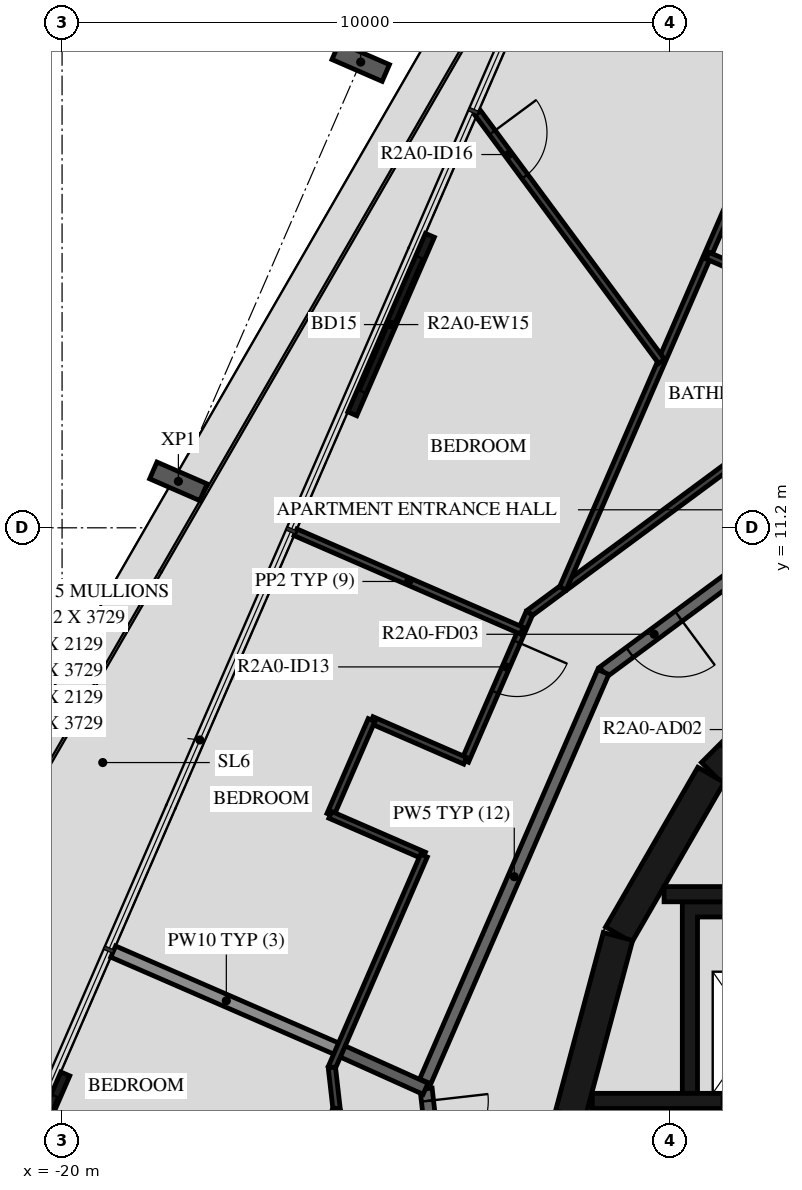
"""IFC4 building model, lengths in metres.
Left out: names, types, materials, properties, quantities, classifications, styles, units other than length and angle.
Written with IfcOpenShell. Run it as: python <this file> out.ifc"""

import sys

from ifc_helpers import new_model, si_unit, direction, frame, frame_2d, origin, origin_2d, place, context, subcontext, project, spatial, polyline, rectangle, i_section, outline, extrude, element, fill, save


model = new_model("IFC4")
c1 = context("Model", 3, precision=1e-05, world=origin(), true_north=direction((0.0, 1.0)))
c2 = subcontext(c1, "Body", "Model", "MODEL_VIEW")
j1 = project(units=[si_unit("LENGTHUNIT", "METRE"), si_unit("PLANEANGLEUNIT", "RADIAN")], contexts=[c1])
p1 = place(None, origin())
s1 = spatial("IfcSite", under=j1, at=p1, CompositionType="ELEMENT")
p2 = place(p1, origin())
s2 = spatial("IfcBuilding", under=s1, at=p2, CompositionType="ELEMENT")
p3 = place(p2, frame((0.0, 0.0, 76.7)))
s3 = spatial("IfcBuildingStorey", under=s2, at=p3, CompositionType="ELEMENT", Elevation=76.7)
for number, where, z_axis, x_axis in (
    (1, (-15.089, 18.859, -0.45), (0.0, 0.0, 1.0), (0.399, 0.917, 0.0)),
    (2, (-18.087, 11.964, -0.45), (0.0, 0.0, 1.0), (0.399, 0.917, 0.0)),
):
    element("IfcColumn", number, at=place(p3, frame(where, z_axis=z_axis, x_axis=x_axis)), inside=s3, PredefinedType="COLUMN", context=c2, shape_type="SweptSolid", body=[
        extrude(i_section(OverallWidth=0.3, OverallDepth=0.9, WebThickness=0.019, FlangeThickness=0.035, FilletRadius=0.03, at=origin_2d()), origin(), (0.0, 0.0, 1.0), 3.57),
    ])
p4 = place(p3, frame((-13.951, 16.01, 0.0), z_axis=(0.0, 0.0, 1.0), x_axis=(-0.398720531764, -0.917072482168, 0.0)))
e3 = element("IfcWall", 3, at=p4, inside=s3, PredefinedType="STANDARD", context=c2, shape_type="SweptSolid", body=[
    extrude(rectangle(XDim=3.2, YDim=0.16, at=frame_2d((1.6, 0.0))), origin(), (0.0, 0.0, 1.0), 3.12),
])
p5 = place(p4, frame((0.4, 0.0, 0.0)))
e4 = element("IfcOpeningElement", 4, at=p5, cuts=e3, PredefinedType="OPENING", context=c2, shape_type="SweptSolid", body=[
    extrude(rectangle(XDim=2.4, YDim=2.4, at=frame_2d((1.2, 1.2))), frame((0.0, 0.09, 0.0), z_axis=(0.0, -1.0, 0.0), x_axis=(1.0, 0.0, 0.0)), (0.0, 0.0, 1.0), 0.18),
])
p6 = place(p3, frame((-19.947, 2.219, 0.0), z_axis=(0.0, 0.0, 1.0), x_axis=(-0.398784695066, -0.917044582876, 0.0)))
e5 = element("IfcWall", 5, at=p6, inside=s3, PredefinedType="STANDARD", context=c2, shape_type="SweptSolid", body=[
    extrude(rectangle(XDim=3.2, YDim=0.16, at=frame_2d((1.6, 0.0))), origin(), (0.0, 0.0, 1.0), 3.12),
])
p7 = place(p6, frame((0.4, 0.0, 0.0)))
e6 = element("IfcOpeningElement", 6, at=p7, cuts=e5, PredefinedType="OPENING", context=c2, shape_type="SweptSolid", body=[
    extrude(rectangle(XDim=2.4, YDim=2.4, at=frame_2d((1.2, 1.2))), frame((0.0, 0.09, 0.0), z_axis=(0.0, -1.0, 0.0), x_axis=(1.0, 0.0, 0.0)), (0.0, 0.0, 1.0), 0.18),
])
p8 = place(p3, frame((-7.164, 9.308, 0.0), z_axis=(0.0, 0.0, 1.0), x_axis=(-0.707106781187, -0.707106781187, 0.0)))
e7 = element("IfcWall", 7, at=p8, inside=s3, PredefinedType="SHEAR", context=c2, shape_type="SweptSolid", body=[
    extrude(rectangle(XDim=3.032, YDim=0.5, at=frame_2d((1.516, 0.0))), origin(), (0.0, 0.0, 1.0), 3.12),
])
p9 = place(p8, frame((1.416, 0.0, 0.0)))
e8 = element("IfcOpeningElement", 8, at=p9, cuts=e7, PredefinedType="OPENING", context=c2, shape_type="SweptSolid", body=[
    extrude(rectangle(XDim=1.2, YDim=2.1, at=frame_2d((0.6, 1.05))), frame((0.0, 0.26, 0.0), z_axis=(0.0, -1.0, 0.0), x_axis=(1.0, 0.0, 0.0)), (0.0, 0.0, 1.0), 0.52),
])
for number, where, z_axis, x_axis in (
    (9, (-9.329, 7.137, 0.0), (0.0, 0.0, 1.0), (-0.5, -0.866, 0.0)),
    (10, (-10.858, 4.479, 0.0), (0.0, 0.0, 1.0), (-0.259, -0.966, 0.0)),
):
    element("IfcWall", number, at=place(p3, frame(where, z_axis=z_axis, x_axis=x_axis)), inside=s3, PredefinedType="SHEAR", context=c2, shape_type="SweptSolid", body=[
        extrude(rectangle(XDim=3.033, YDim=0.5, at=frame_2d((1.516, 0.0))), origin(), (0.0, 0.0, 1.0), 3.12),
    ])
p10 = place(p3, frame((-7.0, 5.175, 0.0), z_axis=(0.0, 0.0, 1.0), x_axis=(-1.0, 0.0, 0.0)))
e11 = element("IfcWall", 11, at=p10, inside=s3, PredefinedType="SHEAR", context=c2, shape_type="SweptSolid", body=[
    extrude(rectangle(XDim=3.1, YDim=0.25, at=frame_2d((1.55, 0.0))), origin(), (0.0, 0.0, 1.0), 3.12),
])
p11 = place(p3, origin())
e12 = element("IfcWall", 12, at=p11, inside=s3, PredefinedType="SHEAR", context=c2, shape_type="SweptSolid", body=[
    extrude(outline(polyline([(-9.55, 4.8), (-7.65, 4.8), (-7.65, 1.9), (-7.4, 1.9), (-7.4, 4.8), (-5.5, 4.8), (-5.5, 1.9), (-5.25, 1.9), (-5.25, 4.8), (-3.35, 4.8), (-3.35, 1.9), (-3.1, 1.9), (-3.1, 4.8), (-1.2, 4.8), (-1.2, 1.9), (-0.95, 1.9), (-0.95, 4.8), (3.1, 4.8), (3.1, 1.9), (3.35, 1.9), (3.35, 4.8), (5.25, 4.8), (5.25, 1.9), (5.5, 1.9), (5.5, 4.8), (7.4, 4.8), (7.4, 1.9), (7.65, 1.9), (7.65, 4.8), (9.55, 4.8), (9.55, 1.9), (9.8, 1.9), (9.8, 4.8), (9.8, 5.05), (-9.8, 5.05), (-9.8, 4.8), (-9.8, 1.9), (-9.55, 1.9), (-9.55, 4.8)])), origin(), (0.0, 0.0, 1.0), 3.12),
])
p12 = place(p3, frame((-11.28, 1.775, 0.0), z_axis=(0.0, 0.0, 1.0), x_axis=(1.0, 0.0, 0.0)))
e13 = element("IfcWall", 13, at=p12, inside=s3, PredefinedType="SHEAR", context=c2, shape_type="SweptSolid", body=[
    extrude(rectangle(XDim=14.38, YDim=0.25, at=frame_2d((7.19, 0.0))), origin(), (0.0, 0.0, 1.0), 3.12),
])
p13 = place(p12, frame((2.13, 0.0, 0.0)))
e14 = element("IfcOpeningElement", 14, at=p13, cuts=e13, PredefinedType="OPENING", context=c2, shape_type="SweptSolid", body=[
    extrude(rectangle(XDim=1.1, YDim=2.1, at=frame_2d((0.55, 1.05))), frame((0.0, 0.135, 0.0), z_axis=(0.0, -1.0, 0.0), x_axis=(1.0, 0.0, 0.0)), (0.0, 0.0, 1.0), 0.27),
])
p14 = place(p12, frame((4.28, 0.0, 0.0)))
e15 = element("IfcOpeningElement", 15, at=p14, cuts=e13, PredefinedType="OPENING", context=c2, shape_type="SweptSolid", body=[
    extrude(rectangle(XDim=1.1, YDim=2.1, at=frame_2d((0.55, 1.05))), frame((0.0, 0.135, 0.0), z_axis=(0.0, -1.0, 0.0), x_axis=(1.0, 0.0, 0.0)), (0.0, 0.0, 1.0), 0.27),
])
p15 = place(p12, frame((6.43, 0.0, 0.0)))
e16 = element("IfcOpeningElement", 16, at=p15, cuts=e13, PredefinedType="OPENING", context=c2, shape_type="SweptSolid", body=[
    extrude(rectangle(XDim=1.1, YDim=2.1, at=frame_2d((0.55, 1.05))), frame((0.0, 0.135, 0.0), z_axis=(0.0, -1.0, 0.0), x_axis=(1.0, 0.0, 0.0)), (0.0, 0.0, 1.0), 0.27),
])
p16 = place(p12, frame((8.58, 0.0, 0.0)))
e17 = element("IfcOpeningElement", 17, at=p16, cuts=e13, PredefinedType="OPENING", context=c2, shape_type="SweptSolid", body=[
    extrude(rectangle(XDim=1.1, YDim=2.1, at=frame_2d((0.55, 1.05))), frame((0.0, 0.135, 0.0), z_axis=(0.0, -1.0, 0.0), x_axis=(1.0, 0.0, 0.0)), (0.0, 0.0, 1.0), 0.27),
])
p17 = place(p12, frame((11.905, 0.0, 0.0)))
e18 = element("IfcOpeningElement", 18, at=p17, cuts=e13, PredefinedType="OPENING", context=c2, shape_type="SweptSolid", body=[
    extrude(rectangle(XDim=0.9, YDim=2.1, at=frame_2d((0.45, 1.05))), frame((0.0, 0.135, 0.0), z_axis=(0.0, -1.0, 0.0), x_axis=(1.0, 0.0, 0.0)), (0.0, 0.0, 1.0), 0.27),
])
p18 = place(p3, frame((-5.198, 13.196, 0.0), z_axis=(0.0, 0.0, 1.0), x_axis=(-0.803869883159, -0.594805187394, 0.0)))
e19 = element("IfcWall", 19, at=p18, inside=s3, PredefinedType="STANDARD", context=c2, shape_type="SweptSolid", body=[
    extrude(rectangle(XDim=7.342, YDim=0.2, at=frame_2d((3.671, 0.0))), origin(), (0.0, 0.0, 1.0), 3.12),
])
p19 = place(p18, frame((5.8, 0.0, 0.0)))
e20 = element("IfcOpeningElement", 20, at=p19, cuts=e19, PredefinedType="OPENING", context=c2, shape_type="SweptSolid", body=[
    extrude(rectangle(XDim=1.0, YDim=2.1, at=frame_2d((0.5, 1.05))), frame((0.0, 0.11, 0.0), z_axis=(0.0, -1.0, 0.0), x_axis=(1.0, 0.0, 0.0)), (0.0, 0.0, 1.0), 0.22),
])
p20 = place(p3, frame((-11.1, 8.829, 0.0), z_axis=(0.0, 0.0, 1.0), x_axis=(-0.398741918631, -0.917063183388, 0.0)))
e21 = element("IfcWall", 21, at=p20, inside=s3, PredefinedType="STANDARD", context=c2, shape_type="SweptSolid", body=[
    extrude(rectangle(XDim=7.342, YDim=0.2, at=frame_2d((3.671, 0.0))), origin(), (0.0, 0.0, 1.0), 3.12),
])
p21 = place(p3, frame((-14.013, 1.974, 0.0), z_axis=(0.0, 0.0, 1.0), x_axis=(0.113196526349, -0.993572617589, 0.0)))
e22 = element("IfcWall", 22, at=p21, inside=s3, PredefinedType="STANDARD", context=c2, shape_type="SweptSolid", body=[
    extrude(rectangle(XDim=7.219, YDim=0.2, at=frame_2d((3.609, 0.0))), origin(), (0.0, 0.0, 1.0), 3.12),
])
p22 = place(p21, frame((0.2, 0.0, 0.0)))
e23 = element("IfcOpeningElement", 23, at=p22, cuts=e22, PredefinedType="OPENING", context=c2, shape_type="SweptSolid", body=[
    extrude(rectangle(XDim=1.0, YDim=2.1, at=frame_2d((0.5, 1.05))), frame((0.0, 0.11, 0.0), z_axis=(0.0, -1.0, 0.0), x_axis=(1.0, 0.0, 0.0)), (0.0, 0.0, 1.0), 0.22),
])
p23 = place(p3, frame((-15.439, 2.613, 0.0), z_axis=(0.0, 0.0, 1.0), x_axis=(0.911830308819, -0.410567275752, 0.0)))
e24 = element("IfcWall", 24, at=p23, inside=s3, PredefinedType="STANDARD", context=c2, shape_type="SweptSolid", body=[
    extrude(rectangle(XDim=1.553, YDim=0.2, at=frame_2d((0.777, 0.0))), origin(), (0.0, 0.0, 1.0), 3.12),
])
p24 = place(p3, frame((-19.159, 4.231, 0.0), z_axis=(0.0, 0.0, 1.0), x_axis=(0.91704996524, -0.398772317562, 0.0)))
e25 = element("IfcWall", 25, at=p24, inside=s3, PredefinedType="STANDARD", context=c2, shape_type="SweptSolid", body=[
    extrude(rectangle(XDim=4.057, YDim=0.2, at=frame_2d((2.029, 0.0))), origin(), (0.0, 0.0, 1.0), 2.73),
])
p25 = place(p3, frame((-5.767, 14.641, 0.0), z_axis=(0.0, 0.0, 1.0), x_axis=(-0.803853364238, -0.594827511807, 0.0)))
e26 = element("IfcWall", 26, at=p25, inside=s3, PredefinedType="PARTITIONING", context=c2, shape_type="SweptSolid", body=[
    extrude(rectangle(XDim=8.146, YDim=0.12, at=frame_2d((4.073, 0.0))), origin(), (0.0, 0.0, 1.0), 3.12),
])
p26 = place(p25, frame((0.97, 0.0, 0.0)))
e27 = element("IfcOpeningElement", 27, at=p26, cuts=e26, PredefinedType="OPENING", context=c2, shape_type="SweptSolid", body=[
    extrude(rectangle(XDim=0.8, YDim=2.1, at=frame_2d((0.4, 1.05))), frame((0.0, 0.07, 0.0), z_axis=(0.0, -1.0, 0.0), x_axis=(1.0, 0.0, 0.0)), (0.0, 0.0, 1.0), 0.14),
])
p27 = place(p3, frame((-12.315, 9.796, 0.0), z_axis=(0.0, 0.0, 1.0), x_axis=(-0.398790200406, -0.917042188812, 0.0)))
e28 = element("IfcWall", 28, at=p27, inside=s3, PredefinedType="PARTITIONING", context=c2, shape_type="SweptSolid", body=[
    extrude(rectangle(XDim=2.646, YDim=0.12, at=frame_2d((1.323, 0.0))), origin(), (0.0, 0.0, 1.0), 3.12),
])
p28 = place(p27, frame((0.513, 0.0, 0.0)))
e29 = element("IfcOpeningElement", 29, at=p28, cuts=e28, PredefinedType="OPENING", context=c2, shape_type="SweptSolid", body=[
    extrude(rectangle(XDim=0.9, YDim=2.1, at=frame_2d((0.45, 1.05))), frame((0.0, 0.07, 0.0), z_axis=(0.0, -1.0, 0.0), x_axis=(1.0, 0.0, 0.0)), (0.0, 0.0, 1.0), 0.14),
])
p29 = place(p3, frame((-13.371, 7.369, 0.0), z_axis=(0.0, 0.0, 1.0), x_axis=(-0.917109358393, 0.398635704306, 0.0)))
e30 = element("IfcWall", 30, at=p29, inside=s3, PredefinedType="PARTITIONING", context=c2, shape_type="SweptSolid", body=[
    extrude(rectangle(XDim=1.679, YDim=0.12, at=frame_2d((0.839, 0.0))), origin(), (0.0, 0.0, 1.0), 3.12),
])
p30 = place(p3, frame((-14.91, 8.038, 0.0), z_axis=(0.0, 0.0, 1.0), x_axis=(-0.398715607479, -0.91707462311, 0.0)))
e31 = element("IfcWall", 31, at=p30, inside=s3, PredefinedType="PARTITIONING", context=c2, shape_type="SweptSolid", body=[
    extrude(rectangle(XDim=1.7, YDim=0.12, at=frame_2d((0.85, 0.0))), origin(), (0.0, 0.0, 1.0), 3.12),
])
p31 = place(p3, frame((-15.588, 6.479, 0.0), z_axis=(0.0, 0.0, 1.0), x_axis=(0.917033055073, -0.398811203332, 0.0)))
e32 = element("IfcWall", 32, at=p31, inside=s3, PredefinedType="PARTITIONING", context=c2, shape_type="SweptSolid", body=[
    extrude(rectangle(XDim=1.678, YDim=0.12, at=frame_2d((0.839, 0.0))), origin(), (0.0, 0.0, 1.0), 3.12),
])
p32 = place(p3, frame((-14.049, 5.81, 0.0), z_axis=(0.0, 0.0, 1.0), x_axis=(-0.398707311688, -0.917078229818, 0.0)))
e33 = element("IfcWall", 33, at=p32, inside=s3, PredefinedType="PARTITIONING", context=c2, shape_type="SweptSolid", body=[
    extrude(rectangle(XDim=3.799, YDim=0.12, at=frame_2d((1.899, 0.0))), origin(), (0.0, 0.0, 1.0), 3.12),
])
p33 = place(p3, frame((-5.952, 23.571, 0.0), z_axis=(0.0, 0.0, 1.0), x_axis=(-0.398745097158, -0.917061801348, 0.0)))
e34 = element("IfcWall", 34, at=p33, inside=s3, PredefinedType="PARTITIONING", context=c2, shape_type="SweptSolid", body=[
    extrude(rectangle(XDim=14.576, YDim=0.12, at=frame_2d((7.288, 0.0))), origin(), (0.0, 0.0, 1.0), 3.12),
])
p34 = place(p33, frame((2.801, 0.0, 0.0)))
e35 = element("IfcOpeningElement", 35, at=p34, cuts=e34, PredefinedType="OPENING", context=c2, shape_type="SweptSolid", body=[
    extrude(rectangle(XDim=0.9, YDim=2.1, at=frame_2d((0.45, 1.05))), frame((0.0, 0.07, 0.0), z_axis=(0.0, -1.0, 0.0), x_axis=(1.0, 0.0, 0.0)), (0.0, 0.0, 1.0), 0.14),
])
p35 = place(p33, frame((1.405, 0.0, 0.0)))
e36 = element("IfcOpeningElement", 36, at=p35, cuts=e34, PredefinedType="OPENING", context=c2, shape_type="SweptSolid", body=[
    extrude(rectangle(XDim=0.9, YDim=2.1, at=frame_2d((0.45, 1.05))), frame((0.0, 0.07, 0.0), z_axis=(0.0, -1.0, 0.0), x_axis=(1.0, 0.0, 0.0)), (0.0, 0.0, 1.0), 0.14),
])
p36 = place(p3, frame((-9.385, 15.676, 0.0), z_axis=(0.0, 0.0, 1.0), x_axis=(0.917068929701, -0.398728702475, 0.0)))
e37 = element("IfcWall", 37, at=p36, inside=s3, PredefinedType="PARTITIONING", context=c2, shape_type="SweptSolid", body=[
    extrude(rectangle(XDim=3.445, YDim=0.12, at=frame_2d((1.723, 0.0))), origin(), (0.0, 0.0, 1.0), 3.12),
])
p37 = place(p3, frame((-13.163, 18.022, 0.0), z_axis=(0.0, 0.0, 1.0), x_axis=(0.594797671626, -0.803875444226, 0.0)))
e38 = element("IfcWall", 38, at=p37, inside=s3, PredefinedType="PARTITIONING", context=c2, shape_type="SweptSolid", body=[
    extrude(rectangle(XDim=5.081, YDim=0.12, at=frame_2d((2.54, 0.0))), origin(), (0.0, 0.0, 1.0), 3.12),
])
p38 = place(p37, frame((0.4, 0.0, 0.0)))
e39 = element("IfcOpeningElement", 39, at=p38, cuts=e38, PredefinedType="OPENING", context=c2, shape_type="SweptSolid", body=[
    extrude(rectangle(XDim=0.9, YDim=2.1, at=frame_2d((0.45, 1.05))), frame((0.0, 0.07, 0.0), z_axis=(0.0, -1.0, 0.0), x_axis=(1.0, 0.0, 0.0)), (0.0, 0.0, 1.0), 0.14),
])
p39 = place(p3, frame((-16.161, 11.126, 0.0), z_axis=(0.0, 0.0, 1.0), x_axis=(0.91705953326, -0.398750313425, 0.0)))
e40 = element("IfcWall", 40, at=p39, inside=s3, PredefinedType="PARTITIONING", context=c2, shape_type="SweptSolid", body=[
    extrude(rectangle(XDim=4.057, YDim=0.12, at=frame_2d((2.029, 0.0))), origin(), (0.0, 0.0, 1.0), 2.73),
])
p40 = place(p3, frame((-15.563, 2.326, 0.0), z_axis=(0.0, 0.0, 1.0), x_axis=(0.113013677091, -0.993593432341, 0.0)))
e41 = element("IfcWall", 41, at=p40, inside=s3, PredefinedType="PARTITIONING", context=c2, shape_type="SweptSolid", body=[
    extrude(rectangle(XDim=0.685, YDim=0.12, at=frame_2d((0.342, 0.0))), origin(), (0.0, 0.0, 1.0), 3.12),
])
p41 = place(p3, frame((-15.486, 1.646, 0.0), z_axis=(0.0, 0.0, 1.0), x_axis=(-0.398701933952, -0.917080567814, 0.0)))
e42 = element("IfcWall", 42, at=p41, inside=s3, PredefinedType="PARTITIONING", context=c2, shape_type="SweptSolid", body=[
    extrude(rectangle(XDim=0.739, YDim=0.12, at=frame_2d((0.369, 0.0))), origin(), (0.0, 0.0, 1.0), 3.12),
])
p42 = place(p5, origin())
e43 = element("IfcDoor", 43, at=p42, inside=s3, OperationType="DOUBLE_DOOR_SLIDING", PredefinedType="DOOR", context=c2, shape_type="SweptSolid", body=[
    extrude(rectangle(XDim=2.4, YDim=2.4, at=frame_2d((1.2, 1.2))), frame((0.0, 0.025, 0.0), z_axis=(0.0, -1.0, 0.0), x_axis=(1.0, 0.0, 0.0)), (0.0, 0.0, 1.0), 0.05),
])
fill(e4, e43)
p43 = place(p7, origin())
e44 = element("IfcDoor", 44, at=p43, inside=s3, OperationType="DOUBLE_DOOR_SLIDING", PredefinedType="DOOR", context=c2, shape_type="SweptSolid", body=[
    extrude(rectangle(XDim=2.4, YDim=2.4, at=frame_2d((1.2, 1.2))), frame((0.0, 0.025, 0.0), z_axis=(0.0, -1.0, 0.0), x_axis=(1.0, 0.0, 0.0)), (0.0, 0.0, 1.0), 0.05),
])
fill(e6, e44)
p44 = place(p13, origin())
e45 = element("IfcDoor", 45, at=p44, inside=s3, OperationType="DOUBLE_DOOR_SLIDING", PredefinedType="DOOR", context=c2, shape_type="SweptSolid", body=[
    extrude(rectangle(XDim=1.1, YDim=2.1, at=frame_2d((0.55, 1.05))), frame((0.0, 0.025, 0.0), z_axis=(0.0, -1.0, 0.0), x_axis=(1.0, 0.0, 0.0)), (0.0, 0.0, 1.0), 0.05),
])
fill(e14, e45)
p45 = place(p19, origin())
e46 = element("IfcDoor", 46, at=p45, inside=s3, OperationType="SINGLE_SWING_LEFT", PredefinedType="DOOR", context=c2, shape_type="SweptSolid", body=[
    extrude(rectangle(XDim=1.0, YDim=2.1, at=frame_2d((0.5, 1.05))), frame((0.0, 0.025, 0.0), z_axis=(0.0, -1.0, 0.0), x_axis=(1.0, 0.0, 0.0)), (0.0, 0.0, 1.0), 0.05),
])
fill(e20, e46)
p46 = place(p28, origin())
e47 = element("IfcDoor", 47, at=p46, inside=s3, OperationType="SINGLE_SWING_LEFT", PredefinedType="DOOR", context=c2, shape_type="SweptSolid", body=[
    extrude(rectangle(XDim=0.9, YDim=2.1, at=frame_2d((0.45, 1.05))), frame((0.0, 0.025, 0.0), z_axis=(0.0, -1.0, 0.0), x_axis=(1.0, 0.0, 0.0)), (0.0, 0.0, 1.0), 0.05),
])
fill(e29, e47)
p47 = place(p38, origin())
e48 = element("IfcDoor", 48, at=p47, inside=s3, OperationType="SINGLE_SWING_RIGHT", PredefinedType="DOOR", context=c2, shape_type="SweptSolid", body=[
    extrude(rectangle(XDim=0.9, YDim=2.1, at=frame_2d((0.45, 1.05))), frame((0.0, 0.025, 0.0), z_axis=(0.0, -1.0, 0.0), x_axis=(1.0, 0.0, 0.0)), (0.0, 0.0, 1.0), 0.05),
])
fill(e39, e48)
p48 = place(p22, origin())
e49 = element("IfcDoor", 49, at=p48, inside=s3, OperationType="SINGLE_SWING_RIGHT", PredefinedType="DOOR", context=c2, shape_type="SweptSolid", body=[
    extrude(rectangle(XDim=1.0, YDim=2.1, at=frame_2d((0.5, 1.05))), frame((0.0, 0.025, 0.0), z_axis=(0.0, -1.0, 0.0), x_axis=(1.0, 0.0, 0.0)), (0.0, 0.0, 1.0), 0.05),
])
fill(e23, e49)
save(model, sys.argv[1])
